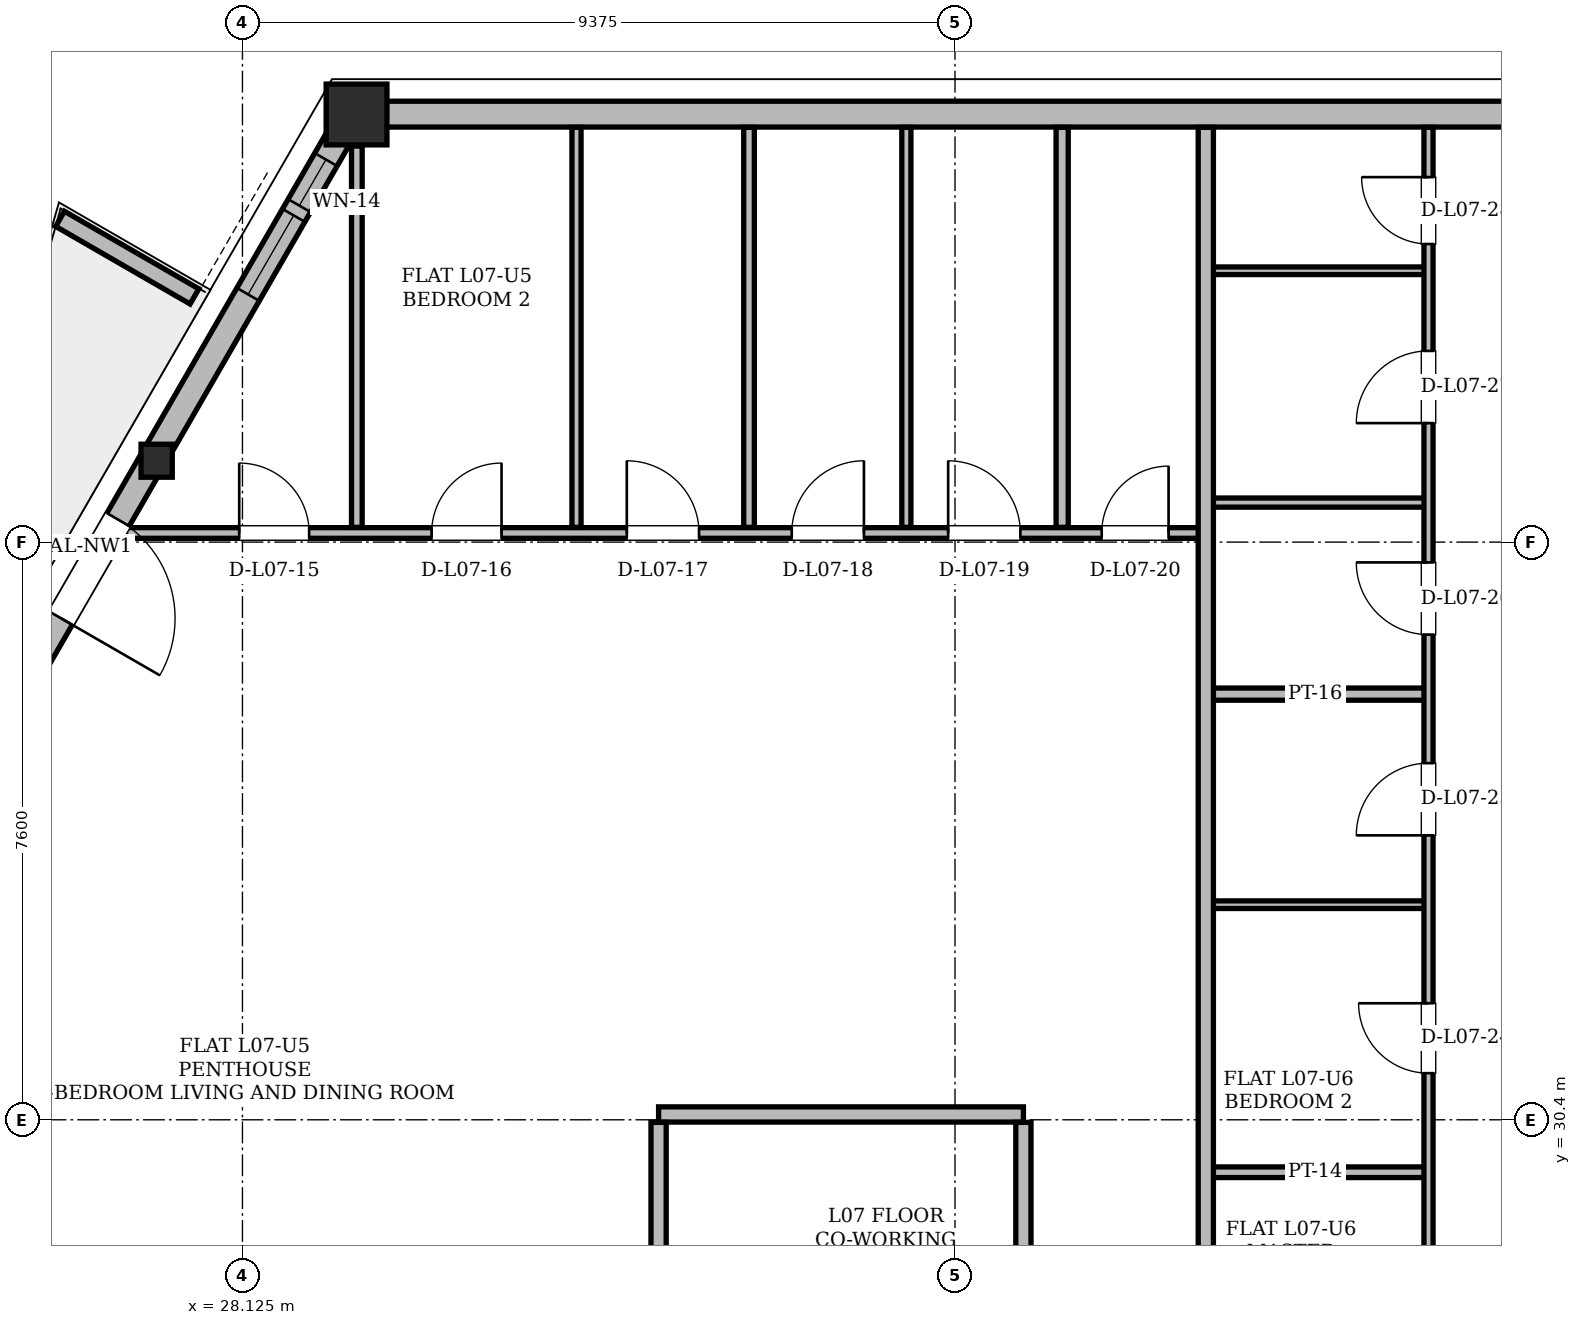
"""IFC4 building model, lengths in metres.
Left out: names, types, materials, properties, quantities, classifications, styles, units other than length and angle.
Written with IfcOpenShell. Run it as: python <this file> out.ifc"""

import sys

from ifc_helpers import new_model, si_unit, direction, frame, frame_2d, origin, origin_2d, place, context, subcontext, project, spatial, polyline, rectangle, hollow_rectangle, i_section, outline, extrude, element, fill, save


model = new_model("IFC4")
c1 = context("Model", 3, precision=1e-05, world=origin(), true_north=direction((0.0, 1.0)))
c2 = subcontext(c1, "Body", "Model", "MODEL_VIEW")
j1 = project(units=[si_unit("LENGTHUNIT", "METRE"), si_unit("PLANEANGLEUNIT", "RADIAN")], contexts=[c1])
p1 = place(None, origin())
s1 = spatial("IfcSite", under=j1, at=p1, CompositionType="ELEMENT")
p2 = place(p1, origin())
s2 = spatial("IfcBuilding", under=s1, at=p2, CompositionType="ELEMENT")
p3 = place(p2, frame((0.0, 0.0, 30.9)))
s3 = spatial("IfcBuildingStorey", under=s2, at=p3, CompositionType="ELEMENT", Elevation=30.9)
p4 = place(p3, frame((29.568, 43.631, 0.005), z_axis=(0.032140461795, -0.002582108981, 0.999480026528), x_axis=(0.080080253565, 0.996788419369, 0.0)))
e1 = element("IfcColumn", 1, at=p4, inside=s3, PredefinedType="COLUMN", context=c2, shape_type="SweptSolid", body=[
    extrude(hollow_rectangle(XDim=0.8, YDim=0.8, WallThickness=0.065, at=origin_2d()), origin(), (0.0, 0.0, 1.0), 3.593),
])
p5 = place(p3, frame((26.942, 39.082, 0.005), z_axis=(0.029899660454, -0.006455608507, 0.999532058227), x_axis=(0.211045983511, 0.977476134156, 0.0)))
e2 = element("IfcColumn", 2, at=p5, inside=s3, PredefinedType="COLUMN", context=c2, shape_type="SweptSolid", body=[
    extrude(i_section(OverallWidth=0.411, OverallDepth=0.434, WebThickness=0.036, FlangeThickness=0.057, at=origin_2d()), origin(), (0.0, 0.0, 1.0), 3.593),
])
p6 = place(p3, frame((45.432, 43.631, 0.0), z_axis=(0.0, 0.0, 1.0), x_axis=(-1.0, 0.0, 0.0)))
e3 = element("IfcWall", 3, at=p6, inside=s3, PredefinedType="SOLIDWALL", context=c2, shape_type="SweptSolid", body=[
    extrude(rectangle(XDim=15.863, YDim=0.34, at=frame_2d((7.932, 0.0))), origin(), (0.0, 0.0, 1.0), 2.494),
])
p7 = place(p3, frame((29.568, 43.631, 0.0), z_axis=(0.0, 0.0, 1.0), x_axis=(-0.500000372107, -0.866025188948, 0.0)))
e4 = element("IfcWall", 4, at=p7, inside=s3, PredefinedType="SOLIDWALL", context=c2, shape_type="SweptSolid", body=[
    extrude(rectangle(XDim=32.825, YDim=0.34, at=frame_2d((16.412, 0.0))), origin(), (0.0, 0.0, 1.0), 2.494),
])
p8 = place(p7, frame((6.159, 0.0, 0.0)))
e5 = element("IfcOpeningElement", 5, at=p8, cuts=e4, PredefinedType="OPENING", context=c2, shape_type="SweptSolid", body=[
    extrude(rectangle(XDim=1.5, YDim=2.2, at=frame_2d((0.75, 1.1))), frame((0.0, 0.17, 0.0), z_axis=(0.0, -1.0, 0.0), x_axis=(1.0, 0.0, 0.0)), (0.0, 0.0, 1.0), 0.34),
])
p9 = place(p7, frame((23.92, 0.0, 0.0)))
e6 = element("IfcOpeningElement", 6, at=p9, cuts=e4, PredefinedType="OPENING", context=c2, shape_type="SweptSolid", body=[
    extrude(rectangle(XDim=1.5, YDim=2.2, at=frame_2d((0.75, 1.1))), frame((0.0, 0.17, 0.0), z_axis=(0.0, -1.0, 0.0), x_axis=(1.0, 0.0, 0.0)), (0.0, 0.0, 1.0), 0.34),
])
p10 = place(p7, frame((29.16, 0.0, 0.85)))
e7 = element("IfcOpeningElement", 7, at=p10, cuts=e4, PredefinedType="OPENING", context=c2, shape_type="SweptSolid", body=[
    extrude(rectangle(XDim=2.4, YDim=1.534, at=frame_2d((1.2, 0.767))), frame((0.0, 0.17, 0.0), z_axis=(0.0, -1.0, 0.0), x_axis=(1.0, 0.0, 0.0)), (0.0, 0.0, 1.0), 0.34),
])
p11 = place(p7, frame((10.76, 0.0, 0.85)))
e8 = element("IfcOpeningElement", 8, at=p11, cuts=e4, PredefinedType="OPENING", context=c2, shape_type="SweptSolid", body=[
    extrude(rectangle(XDim=2.5, YDim=1.534, at=frame_2d((1.25, 0.767))), frame((0.0, 0.17, 0.0), z_axis=(0.0, -1.0, 0.0), x_axis=(1.0, 0.0, 0.0)), (0.0, 0.0, 1.0), 0.34),
])
p12 = place(p7, frame((17.732, 0.0, 0.85)))
e9 = element("IfcOpeningElement", 9, at=p12, cuts=e4, PredefinedType="OPENING", context=c2, shape_type="SweptSolid", body=[
    extrude(rectangle(XDim=2.4, YDim=1.534, at=frame_2d((1.2, 0.767))), frame((0.0, 0.17, 0.0), z_axis=(0.0, -1.0, 0.0), x_axis=(1.0, 0.0, 0.0)), (0.0, 0.0, 1.0), 0.34),
])
p13 = place(p7, frame((1.539, 0.0, 0.85)))
e10 = element("IfcOpeningElement", 10, at=p13, cuts=e4, PredefinedType="OPENING", context=c2, shape_type="SweptSolid", body=[
    extrude(rectangle(XDim=1.2, YDim=1.48, at=frame_2d((0.6, 0.74))), frame((0.0, 0.17, 0.0), z_axis=(0.0, -1.0, 0.0), x_axis=(1.0, 0.0, 0.0)), (0.0, 0.0, 1.0), 0.34),
])
p14 = place(p7, frame((0.69, 0.0, 0.85)))
e11 = element("IfcOpeningElement", 11, at=p14, cuts=e4, PredefinedType="OPENING", context=c2, shape_type="SweptSolid", body=[
    extrude(rectangle(XDim=0.7, YDim=1.2, at=frame_2d((0.35, 0.6))), frame((0.0, 0.17, 0.0), z_axis=(0.0, -1.0, 0.0), x_axis=(1.0, 0.0, 0.0)), (0.0, 0.0, 1.0), 0.34),
])
p15 = place(p3, frame((27.493, 41.232, 0.0), z_axis=(0.0, 0.0, 1.0), x_axis=(-0.866042246008, 0.499970827278, 0.0)))
e12 = element("IfcWall", 12, at=p15, inside=s3, PredefinedType="PARAPET", context=c2, shape_type="SweptSolid", body=[
    extrude(outline(polyline([(0.0, 0.0), (2.042, 0.0), (2.042, 1.1), (0.0, 1.32), (0.0, 0.0)])), frame((0.0, 0.115, 0.0), z_axis=(0.0, -1.0, 0.0), x_axis=(1.0, 0.0, 0.0)), (0.0, 0.0, 1.0), 0.23),
])
p16 = place(p3, frame((40.75, 29.71, 0.0), z_axis=(0.0, 0.0, 1.0), x_axis=(1.0, 0.0, 0.0)))
e13 = element("IfcWall", 13, at=p16, inside=s3, PredefinedType="PARTITIONING", context=c2, shape_type="SweptSolid", body=[
    extrude(rectangle(XDim=2.98, YDim=0.14, at=frame_2d((1.49, 0.0))), origin(), (0.0, 0.0, 1.0), 3.36),
])
p17 = place(p3, frame((33.6, 30.47, 0.0), z_axis=(0.0, 0.0, 1.0), x_axis=(1.0, 0.0, 0.0)))
e14 = element("IfcWall", 14, at=p17, inside=s3, PredefinedType="PARTITIONING", context=c2, shape_type="SweptSolid", body=[
    extrude(rectangle(XDim=4.8, YDim=0.2, at=frame_2d((2.4, 0.0))), origin(), (0.0, 0.0, 1.0), 3.36),
])
p18 = place(p3, frame((40.75, 33.23, 0.0), z_axis=(0.0, 0.0, 1.0), x_axis=(1.0, 0.0, 0.0)))
e15 = element("IfcWall", 15, at=p18, inside=s3, PredefinedType="PARTITIONING", context=c2, shape_type="SweptSolid", body=[
    extrude(rectangle(XDim=2.98, YDim=0.1, at=frame_2d((1.49, 0.0))), origin(), (0.0, 0.0, 1.0), 3.36),
])
p19 = place(p3, frame((40.75, 36.0, 0.0), z_axis=(0.0, 0.0, 1.0), x_axis=(1.0, 0.0, 0.0)))
e16 = element("IfcWall", 16, at=p19, inside=s3, PredefinedType="PARTITIONING", context=c2, shape_type="SweptSolid", body=[
    extrude(rectangle(XDim=2.98, YDim=0.16, at=frame_2d((1.49, 0.0))), origin(), (0.0, 0.0, 1.0), 3.36),
])
p20 = place(p3, frame((26.588, 38.12, 0.0), z_axis=(0.0, 0.0, 1.0), x_axis=(1.0, 0.0, 0.0)))
e17 = element("IfcWall", 17, at=p20, inside=s3, PredefinedType="PARTITIONING", context=c2, shape_type="SweptSolid", body=[
    extrude(rectangle(XDim=14.262, YDim=0.14, at=frame_2d((7.131, 0.0))), origin(), (0.0, 0.0, 1.0), 2.738),
])
p21 = place(p20, frame((1.495, 0.0, 0.0)))
e18 = element("IfcOpeningElement", 18, at=p21, cuts=e17, PredefinedType="OPENING", context=c2, shape_type="SweptSolid", body=[
    extrude(rectangle(XDim=0.92, YDim=2.12, at=frame_2d((0.46, 1.06))), frame((0.0, 0.07, 0.0), z_axis=(0.0, -1.0, 0.0), x_axis=(1.0, 0.0, 0.0)), (0.0, 0.0, 1.0), 0.14),
])
p22 = place(p20, frame((4.026, 0.0, 0.0)))
e19 = element("IfcOpeningElement", 19, at=p22, cuts=e17, PredefinedType="OPENING", context=c2, shape_type="SweptSolid", body=[
    extrude(rectangle(XDim=0.92, YDim=2.12, at=frame_2d((0.46, 1.06))), frame((0.0, 0.07, 0.0), z_axis=(0.0, -1.0, 0.0), x_axis=(1.0, 0.0, 0.0)), (0.0, 0.0, 1.0), 0.14),
])
p23 = place(p20, frame((6.594, 0.0, 0.0)))
e20 = element("IfcOpeningElement", 20, at=p23, cuts=e17, PredefinedType="OPENING", context=c2, shape_type="SweptSolid", body=[
    extrude(rectangle(XDim=0.95, YDim=2.1, at=frame_2d((0.475, 1.05))), frame((0.0, 0.07, 0.0), z_axis=(0.0, -1.0, 0.0), x_axis=(1.0, 0.0, 0.0)), (0.0, 0.0, 1.0), 0.14),
])
p24 = place(p20, frame((8.764, 0.0, 0.0)))
e21 = element("IfcOpeningElement", 21, at=p24, cuts=e17, PredefinedType="OPENING", context=c2, shape_type="SweptSolid", body=[
    extrude(rectangle(XDim=0.95, YDim=2.1, at=frame_2d((0.475, 1.05))), frame((0.0, 0.07, 0.0), z_axis=(0.0, -1.0, 0.0), x_axis=(1.0, 0.0, 0.0)), (0.0, 0.0, 1.0), 0.14),
])
p25 = place(p20, frame((10.822, 0.0, 0.0)))
e22 = element("IfcOpeningElement", 22, at=p25, cuts=e17, PredefinedType="OPENING", context=c2, shape_type="SweptSolid", body=[
    extrude(rectangle(XDim=0.95, YDim=2.1, at=frame_2d((0.475, 1.05))), frame((0.0, 0.07, 0.0), z_axis=(0.0, -1.0, 0.0), x_axis=(1.0, 0.0, 0.0)), (0.0, 0.0, 1.0), 0.14),
])
p26 = place(p20, frame((12.842, 0.0, 0.0)))
e23 = element("IfcOpeningElement", 23, at=p26, cuts=e17, PredefinedType="OPENING", context=c2, shape_type="SweptSolid", body=[
    extrude(rectangle(XDim=0.88, YDim=2.08, at=frame_2d((0.44, 1.04))), frame((0.0, 0.07, 0.0), z_axis=(0.0, -1.0, 0.0), x_axis=(1.0, 0.0, 0.0)), (0.0, 0.0, 1.0), 0.14),
])
p27 = place(p3, frame((40.75, 38.52, 0.0), z_axis=(0.0, 0.0, 1.0), x_axis=(1.0, 0.0, 0.0)))
e24 = element("IfcWall", 24, at=p27, inside=s3, PredefinedType="PARTITIONING", context=c2, shape_type="SweptSolid", body=[
    extrude(rectangle(XDim=2.98, YDim=0.12, at=frame_2d((1.49, 0.0))), origin(), (0.0, 0.0, 1.0), 3.36),
])
p28 = place(p3, frame((40.75, 41.57, 0.0), z_axis=(0.0, 0.0, 1.0), x_axis=(1.0, 0.0, 0.0)))
e25 = element("IfcWall", 25, at=p28, inside=s3, PredefinedType="PARTITIONING", context=c2, shape_type="SweptSolid", body=[
    extrude(rectangle(XDim=2.98, YDim=0.1, at=frame_2d((1.49, 0.0))), origin(), (0.0, 0.0, 1.0), 3.36),
])
p29 = place(p3, frame((29.63, 38.194, 0.0), z_axis=(0.0, 0.0, 1.0), x_axis=(0.0, 1.0, 0.0)))
e26 = element("IfcWall", 26, at=p29, inside=s3, PredefinedType="PARTITIONING", context=c2, shape_type="SweptSolid", body=[
    extrude(rectangle(XDim=5.017, YDim=0.14, at=frame_2d((2.508, 0.0))), origin(), (0.0, 0.0, 1.0), 2.738),
])
p30 = place(p3, frame((32.52, 38.194, 0.0), z_axis=(0.0, 0.0, 1.0), x_axis=(0.0, 1.0, 0.0)))
e27 = element("IfcWall", 27, at=p30, inside=s3, PredefinedType="PARTITIONING", context=c2, shape_type="SweptSolid", body=[
    extrude(rectangle(XDim=5.262, YDim=0.12, at=frame_2d((2.631, 0.0))), origin(), (0.0, 0.0, 1.0), 3.36),
])
p31 = place(p3, frame((33.6, 26.074, 0.0), z_axis=(0.0, 0.0, 1.0), x_axis=(0.0, 1.0, 0.0)))
e28 = element("IfcWall", 28, at=p31, inside=s3, PredefinedType="PARTITIONING", context=c2, shape_type="SweptSolid", body=[
    extrude(rectangle(XDim=4.292, YDim=0.2, at=frame_2d((2.146, 0.0))), origin(), (0.0, 0.0, 1.0), 3.36),
])
p32 = place(p3, frame((34.79, 38.194, 0.0), z_axis=(0.0, 0.0, 1.0), x_axis=(0.0, 1.0, 0.0)))
e29 = element("IfcWall", 29, at=p32, inside=s3, PredefinedType="PARTITIONING", context=c2, shape_type="SweptSolid", body=[
    extrude(rectangle(XDim=5.262, YDim=0.14, at=frame_2d((2.631, 0.0))), origin(), (0.0, 0.0, 1.0), 3.36),
])
p33 = place(p3, frame((36.86, 38.194, 0.0), z_axis=(0.0, 0.0, 1.0), x_axis=(0.0, 1.0, 0.0)))
e30 = element("IfcWall", 30, at=p33, inside=s3, PredefinedType="PARTITIONING", context=c2, shape_type="SweptSolid", body=[
    extrude(rectangle(XDim=5.262, YDim=0.12, at=frame_2d((2.631, 0.0))), origin(), (0.0, 0.0, 1.0), 3.36),
])
p34 = place(p3, frame((38.4, 26.074, 0.0), z_axis=(0.0, 0.0, 1.0), x_axis=(0.0, 1.0, 0.0)))
e31 = element("IfcWall", 31, at=p34, inside=s3, PredefinedType="PARTITIONING", context=c2, shape_type="SweptSolid", body=[
    extrude(rectangle(XDim=4.292, YDim=0.2, at=frame_2d((2.146, 0.0))), origin(), (0.0, 0.0, 1.0), 3.36),
])
p35 = place(p3, frame((38.91, 38.194, 0.0), z_axis=(0.0, 0.0, 1.0), x_axis=(0.0, 1.0, 0.0)))
e32 = element("IfcWall", 32, at=p35, inside=s3, PredefinedType="PARTITIONING", context=c2, shape_type="SweptSolid", body=[
    extrude(rectangle(XDim=5.262, YDim=0.16, at=frame_2d((2.631, 0.0))), origin(), (0.0, 0.0, 1.0), 3.36),
])
p36 = place(p3, frame((40.8, 26.074, 0.0), z_axis=(0.0, 0.0, 1.0), x_axis=(0.0, 1.0, 0.0)))
e33 = element("IfcWall", 33, at=p36, inside=s3, PredefinedType="PARTITIONING", context=c2, shape_type="SweptSolid", body=[
    extrude(rectangle(XDim=17.383, YDim=0.2, at=frame_2d((8.691, 0.0))), origin(), (0.0, 0.0, 1.0), 3.36),
])
p37 = place(p3, frame((43.73, 26.074, 0.0), z_axis=(0.0, 0.0, 1.0), x_axis=(0.0, 1.0, 0.0)))
e34 = element("IfcWall", 34, at=p37, inside=s3, PredefinedType="PARTITIONING", context=c2, shape_type="SweptSolid", body=[
    extrude(rectangle(XDim=17.383, YDim=0.12, at=frame_2d((8.691, 0.0))), origin(), (0.0, 0.0, 1.0), 3.36),
])
p38 = place(p37, frame((1.292, 0.0, 0.0)))
e35 = element("IfcOpeningElement", 35, at=p38, cuts=e34, PredefinedType="OPENING", context=c2, shape_type="SweptSolid", body=[
    extrude(rectangle(XDim=0.92, YDim=2.12, at=frame_2d((0.46, 1.06))), frame((0.0, 0.06, 0.0), z_axis=(0.0, -1.0, 0.0), x_axis=(1.0, 0.0, 0.0)), (0.0, 0.0, 1.0), 0.12),
])
p39 = place(p37, frame((4.939, 0.0, 0.0)))
e36 = element("IfcOpeningElement", 36, at=p39, cuts=e34, PredefinedType="OPENING", context=c2, shape_type="SweptSolid", body=[
    extrude(rectangle(XDim=0.92, YDim=2.12, at=frame_2d((0.46, 1.06))), frame((0.0, 0.06, 0.0), z_axis=(0.0, -1.0, 0.0), x_axis=(1.0, 0.0, 0.0)), (0.0, 0.0, 1.0), 0.12),
])
p40 = place(p37, frame((8.068, 0.0, 0.0)))
e37 = element("IfcOpeningElement", 37, at=p40, cuts=e34, PredefinedType="OPENING", context=c2, shape_type="SweptSolid", body=[
    extrude(rectangle(XDim=0.95, YDim=2.1, at=frame_2d((0.475, 1.05))), frame((0.0, 0.06, 0.0), z_axis=(0.0, -1.0, 0.0), x_axis=(1.0, 0.0, 0.0)), (0.0, 0.0, 1.0), 0.12),
])
p41 = place(p37, frame((10.709, 0.0, 0.0)))
e38 = element("IfcOpeningElement", 38, at=p41, cuts=e34, PredefinedType="OPENING", context=c2, shape_type="SweptSolid", body=[
    extrude(rectangle(XDim=0.95, YDim=2.1, at=frame_2d((0.475, 1.05))), frame((0.0, 0.06, 0.0), z_axis=(0.0, -1.0, 0.0), x_axis=(1.0, 0.0, 0.0)), (0.0, 0.0, 1.0), 0.12),
])
p42 = place(p37, frame((13.491, 0.0, 0.0)))
e39 = element("IfcOpeningElement", 39, at=p42, cuts=e34, PredefinedType="OPENING", context=c2, shape_type="SweptSolid", body=[
    extrude(rectangle(XDim=0.95, YDim=2.1, at=frame_2d((0.475, 1.05))), frame((0.0, 0.06, 0.0), z_axis=(0.0, -1.0, 0.0), x_axis=(1.0, 0.0, 0.0)), (0.0, 0.0, 1.0), 0.12),
])
p43 = place(p37, frame((15.848, 0.0, 0.0)))
e40 = element("IfcOpeningElement", 40, at=p43, cuts=e34, PredefinedType="OPENING", context=c2, shape_type="SweptSolid", body=[
    extrude(rectangle(XDim=0.88, YDim=2.08, at=frame_2d((0.44, 1.04))), frame((0.0, 0.06, 0.0), z_axis=(0.0, -1.0, 0.0), x_axis=(1.0, 0.0, 0.0)), (0.0, 0.0, 1.0), 0.12),
])
p44 = place(p8, origin())
e41 = element("IfcDoor", 41, at=p44, inside=s3, OperationType="SINGLE_SWING_RIGHT", PredefinedType="DOOR", context=c2, shape_type="SweptSolid", body=[
    extrude(rectangle(XDim=1.5, YDim=2.2, at=frame_2d((0.75, 1.1))), frame((0.0, 0.025, 0.0), z_axis=(0.0, -1.0, 0.0), x_axis=(1.0, 0.0, 0.0)), (0.0, 0.0, 1.0), 0.05),
])
fill(e5, e41)
p45 = place(p13, origin())
e42 = element("IfcWindow", 42, at=p45, inside=s3, PartitioningType="SINGLE_PANEL", PredefinedType="WINDOW", context=c2, shape_type="SweptSolid", body=[
    extrude(rectangle(XDim=1.2, YDim=1.48, at=frame_2d((0.6, 0.74))), frame((0.0, 0.03, 0.0), z_axis=(0.0, -1.0, 0.0), x_axis=(1.0, 0.0, 0.0)), (0.0, 0.0, 1.0), 0.06),
])
fill(e10, e42)
p46 = place(p14, origin())
e43 = element("IfcWindow", 43, at=p46, inside=s3, PartitioningType="SINGLE_PANEL", PredefinedType="WINDOW", context=c2, shape_type="SweptSolid", body=[
    extrude(rectangle(XDim=0.7, YDim=1.2, at=frame_2d((0.35, 0.6))), frame((0.0, 0.03, 0.0), z_axis=(0.0, -1.0, 0.0), x_axis=(1.0, 0.0, 0.0)), (0.0, 0.0, 1.0), 0.06),
])
fill(e11, e43)
p47 = place(p21, origin())
e44 = element("IfcDoor", 44, at=p47, inside=s3, OperationType="SINGLE_SWING_LEFT", PredefinedType="DOOR", context=c2, shape_type="SweptSolid", body=[
    extrude(rectangle(XDim=0.92, YDim=2.12, at=frame_2d((0.46, 1.06))), frame((0.0, 0.025, 0.0), z_axis=(0.0, -1.0, 0.0), x_axis=(1.0, 0.0, 0.0)), (0.0, 0.0, 1.0), 0.05),
])
fill(e18, e44)
p48 = place(p22, origin())
e45 = element("IfcDoor", 45, at=p48, inside=s3, OperationType="SINGLE_SWING_RIGHT", PredefinedType="DOOR", context=c2, shape_type="SweptSolid", body=[
    extrude(rectangle(XDim=0.92, YDim=2.12, at=frame_2d((0.46, 1.06))), frame((0.0, 0.025, 0.0), z_axis=(0.0, -1.0, 0.0), x_axis=(1.0, 0.0, 0.0)), (0.0, 0.0, 1.0), 0.05),
])
fill(e19, e45)
p49 = place(p23, origin())
e46 = element("IfcDoor", 46, at=p49, inside=s3, OperationType="SINGLE_SWING_LEFT", PredefinedType="DOOR", context=c2, shape_type="SweptSolid", body=[
    extrude(rectangle(XDim=0.95, YDim=2.1, at=frame_2d((0.475, 1.05))), frame((0.0, 0.025, 0.0), z_axis=(0.0, -1.0, 0.0), x_axis=(1.0, 0.0, 0.0)), (0.0, 0.0, 1.0), 0.05),
])
fill(e20, e46)
p50 = place(p24, origin())
e47 = element("IfcDoor", 47, at=p50, inside=s3, OperationType="SINGLE_SWING_RIGHT", PredefinedType="DOOR", context=c2, shape_type="SweptSolid", body=[
    extrude(rectangle(XDim=0.95, YDim=2.1, at=frame_2d((0.475, 1.05))), frame((0.0, 0.025, 0.0), z_axis=(0.0, -1.0, 0.0), x_axis=(1.0, 0.0, 0.0)), (0.0, 0.0, 1.0), 0.05),
])
fill(e21, e47)
p51 = place(p25, origin())
e48 = element("IfcDoor", 48, at=p51, inside=s3, OperationType="SINGLE_SWING_LEFT", PredefinedType="DOOR", context=c2, shape_type="SweptSolid", body=[
    extrude(rectangle(XDim=0.95, YDim=2.1, at=frame_2d((0.475, 1.05))), frame((0.0, 0.025, 0.0), z_axis=(0.0, -1.0, 0.0), x_axis=(1.0, 0.0, 0.0)), (0.0, 0.0, 1.0), 0.05),
])
fill(e22, e48)
p52 = place(p26, origin())
e49 = element("IfcDoor", 49, at=p52, inside=s3, OperationType="SINGLE_SWING_RIGHT", PredefinedType="DOOR", context=c2, shape_type="SweptSolid", body=[
    extrude(rectangle(XDim=0.88, YDim=2.08, at=frame_2d((0.44, 1.04))), frame((0.0, 0.025, 0.0), z_axis=(0.0, -1.0, 0.0), x_axis=(1.0, 0.0, 0.0)), (0.0, 0.0, 1.0), 0.05),
])
fill(e23, e49)
p53 = place(p39, origin())
e50 = element("IfcDoor", 50, at=p53, inside=s3, OperationType="SINGLE_SWING_RIGHT", PredefinedType="DOOR", context=c2, shape_type="SweptSolid", body=[
    extrude(rectangle(XDim=0.92, YDim=2.12, at=frame_2d((0.46, 1.06))), frame((0.0, 0.025, 0.0), z_axis=(0.0, -1.0, 0.0), x_axis=(1.0, 0.0, 0.0)), (0.0, 0.0, 1.0), 0.05),
])
fill(e36, e50)
p54 = place(p40, origin())
e51 = element("IfcDoor", 51, at=p54, inside=s3, OperationType="SINGLE_SWING_LEFT", PredefinedType="DOOR", context=c2, shape_type="SweptSolid", body=[
    extrude(rectangle(XDim=0.95, YDim=2.1, at=frame_2d((0.475, 1.05))), frame((0.0, 0.025, 0.0), z_axis=(0.0, -1.0, 0.0), x_axis=(1.0, 0.0, 0.0)), (0.0, 0.0, 1.0), 0.05),
])
fill(e37, e51)
p55 = place(p41, origin())
e52 = element("IfcDoor", 52, at=p55, inside=s3, OperationType="SINGLE_SWING_RIGHT", PredefinedType="DOOR", context=c2, shape_type="SweptSolid", body=[
    extrude(rectangle(XDim=0.95, YDim=2.1, at=frame_2d((0.475, 1.05))), frame((0.0, 0.025, 0.0), z_axis=(0.0, -1.0, 0.0), x_axis=(1.0, 0.0, 0.0)), (0.0, 0.0, 1.0), 0.05),
])
fill(e38, e52)
p56 = place(p42, origin())
e53 = element("IfcDoor", 53, at=p56, inside=s3, OperationType="SINGLE_SWING_LEFT", PredefinedType="DOOR", context=c2, shape_type="SweptSolid", body=[
    extrude(rectangle(XDim=0.95, YDim=2.1, at=frame_2d((0.475, 1.05))), frame((0.0, 0.025, 0.0), z_axis=(0.0, -1.0, 0.0), x_axis=(1.0, 0.0, 0.0)), (0.0, 0.0, 1.0), 0.05),
])
fill(e39, e53)
p57 = place(p43, origin())
e54 = element("IfcDoor", 54, at=p57, inside=s3, OperationType="SINGLE_SWING_RIGHT", PredefinedType="DOOR", context=c2, shape_type="SweptSolid", body=[
    extrude(rectangle(XDim=0.88, YDim=2.08, at=frame_2d((0.44, 1.04))), frame((0.0, 0.025, 0.0), z_axis=(0.0, -1.0, 0.0), x_axis=(1.0, 0.0, 0.0)), (0.0, 0.0, 1.0), 0.05),
])
fill(e40, e54)
save(model, sys.argv[1])
